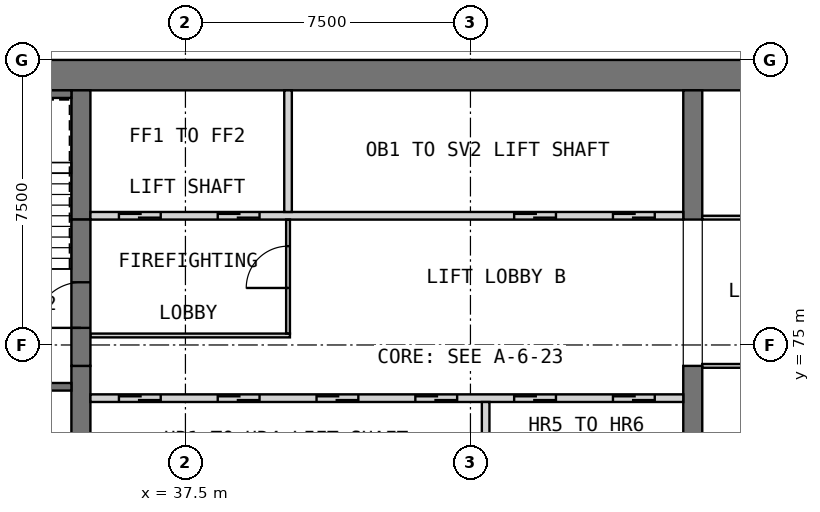
"""IFC4 building model, lengths in metres.
Left out: names, types, materials, properties, quantities, classifications, styles, units other than length and angle.
Written with IfcOpenShell. Run it as: python <this file> out.ifc"""

import sys

from ifc_helpers import new_model, si_unit, direction, frame, frame_2d, origin, place, context, subcontext, project, spatial, rectangle, extrude, element, fill, save


model = new_model("IFC4")
c1 = context("Model", 3, precision=1e-05, world=origin(), true_north=direction((0.0, 1.0)))
c2 = subcontext(c1, "Body", "Model", "MODEL_VIEW")
j1 = project(units=[si_unit("LENGTHUNIT", "METRE"), si_unit("PLANEANGLEUNIT", "RADIAN")], contexts=[c1])
p1 = place(None, origin())
s1 = spatial("IfcSite", under=j1, at=p1, CompositionType="ELEMENT")
p2 = place(p1, origin())
s2 = spatial("IfcBuilding", under=s1, at=p2, CompositionType="ELEMENT")
p3 = place(p2, frame((0.0, 0.0, 186.2)))
s3 = spatial("IfcBuildingStorey", under=s2, at=p3, CompositionType="ELEMENT", Elevation=186.2)
p4 = place(p3, frame((30.0, 82.1, 0.0), z_axis=(0.0, 0.0, 1.0), x_axis=(1.0, 0.0, 0.0)))
e1 = element("IfcWall", 1, at=p4, inside=s3, PredefinedType="SHEAR", context=c2, shape_type="SweptSolid", body=[
    extrude(rectangle(XDim=30.0, YDim=0.8, at=frame_2d((15.0, 0.0))), origin(), (0.0, 0.0, 1.0), 3.5),
])
p5 = place(p3, frame((34.75, 68.05, 0.0), z_axis=(0.0, 0.0, 1.0), x_axis=(0.0, 1.0, 0.0)))
e2 = element("IfcWall", 2, at=p5, inside=s3, PredefinedType="SHEAR", context=c2, shape_type="SweptSolid", body=[
    extrude(rectangle(XDim=6.4, YDim=0.5, at=frame_2d((3.2, 0.0))), origin(), (0.0, 0.0, 1.0), 3.5),
])
p6 = place(p3, frame((34.75, 78.3, 0.0), z_axis=(0.0, 0.0, 1.0), x_axis=(0.0, 1.0, 0.0)))
e3 = element("IfcWall", 3, at=p6, inside=s3, PredefinedType="SHEAR", context=c2, shape_type="SweptSolid", body=[
    extrude(rectangle(XDim=3.4, YDim=0.5, at=frame_2d((1.7, 0.0))), origin(), (0.0, 0.0, 1.0), 3.5),
])
p7 = place(p3, frame((50.85, 68.05, 0.0), z_axis=(0.0, 0.0, 1.0), x_axis=(0.0, 1.0, 0.0)))
e4 = element("IfcWall", 4, at=p7, inside=s3, PredefinedType="SHEAR", context=c2, shape_type="SweptSolid", body=[
    extrude(rectangle(XDim=6.4, YDim=0.5, at=frame_2d((3.2, 0.0))), origin(), (0.0, 0.0, 1.0), 3.5),
])
p8 = place(p3, frame((50.85, 78.3, 0.0), z_axis=(0.0, 0.0, 1.0), x_axis=(0.0, 1.0, 0.0)))
e5 = element("IfcWall", 5, at=p8, inside=s3, PredefinedType="SHEAR", context=c2, shape_type="SweptSolid", body=[
    extrude(rectangle(XDim=3.4, YDim=0.5, at=frame_2d((1.7, 0.0))), origin(), (0.0, 0.0, 1.0), 3.5),
])
p9 = place(p3, frame((35.0, 73.6, 0.0), z_axis=(0.0, 0.0, 1.0), x_axis=(1.0, 0.0, 0.0)))
e6 = element("IfcWall", 6, at=p9, inside=s3, PredefinedType="SOLIDWALL", context=c2, shape_type="SweptSolid", body=[
    extrude(rectangle(XDim=15.6, YDim=0.2, at=frame_2d((7.8, 0.0))), origin(), (0.0, 0.0, 1.0), 3.5),
])
p10 = place(p9, frame((0.75, 0.0, 0.0)))
e7 = element("IfcOpeningElement", 7, at=p10, cuts=e6, PredefinedType="OPENING", context=c2, shape_type="SweptSolid", body=[
    extrude(rectangle(XDim=1.1, YDim=2.1, at=frame_2d((0.55, 1.05))), frame((0.0, 0.11, 0.0), z_axis=(0.0, -1.0, 0.0), x_axis=(1.0, 0.0, 0.0)), (0.0, 0.0, 1.0), 0.22),
])
p11 = place(p9, frame((3.35, 0.0, 0.0)))
e8 = element("IfcOpeningElement", 8, at=p11, cuts=e6, PredefinedType="OPENING", context=c2, shape_type="SweptSolid", body=[
    extrude(rectangle(XDim=1.1, YDim=2.1, at=frame_2d((0.55, 1.05))), frame((0.0, 0.11, 0.0), z_axis=(0.0, -1.0, 0.0), x_axis=(1.0, 0.0, 0.0)), (0.0, 0.0, 1.0), 0.22),
])
p12 = place(p9, frame((5.95, 0.0, 0.0)))
e9 = element("IfcOpeningElement", 9, at=p12, cuts=e6, PredefinedType="OPENING", context=c2, shape_type="SweptSolid", body=[
    extrude(rectangle(XDim=1.1, YDim=2.1, at=frame_2d((0.55, 1.05))), frame((0.0, 0.11, 0.0), z_axis=(0.0, -1.0, 0.0), x_axis=(1.0, 0.0, 0.0)), (0.0, 0.0, 1.0), 0.22),
])
p13 = place(p9, frame((8.55, 0.0, 0.0)))
e10 = element("IfcOpeningElement", 10, at=p13, cuts=e6, PredefinedType="OPENING", context=c2, shape_type="SweptSolid", body=[
    extrude(rectangle(XDim=1.1, YDim=2.1, at=frame_2d((0.55, 1.05))), frame((0.0, 0.11, 0.0), z_axis=(0.0, -1.0, 0.0), x_axis=(1.0, 0.0, 0.0)), (0.0, 0.0, 1.0), 0.22),
])
p14 = place(p9, frame((11.15, 0.0, 0.0)))
e11 = element("IfcOpeningElement", 11, at=p14, cuts=e6, PredefinedType="OPENING", context=c2, shape_type="SweptSolid", body=[
    extrude(rectangle(XDim=1.1, YDim=2.1, at=frame_2d((0.55, 1.05))), frame((0.0, 0.11, 0.0), z_axis=(0.0, -1.0, 0.0), x_axis=(1.0, 0.0, 0.0)), (0.0, 0.0, 1.0), 0.22),
])
p15 = place(p9, frame((13.75, 0.0, 0.0)))
e12 = element("IfcOpeningElement", 12, at=p15, cuts=e6, PredefinedType="OPENING", context=c2, shape_type="SweptSolid", body=[
    extrude(rectangle(XDim=1.1, YDim=2.1, at=frame_2d((0.55, 1.05))), frame((0.0, 0.11, 0.0), z_axis=(0.0, -1.0, 0.0), x_axis=(1.0, 0.0, 0.0)), (0.0, 0.0, 1.0), 0.22),
])
p16 = place(p3, frame((45.4, 71.5, 0.0), z_axis=(0.0, 0.0, 1.0), x_axis=(0.0, 1.0, 0.0)))
e13 = element("IfcWall", 13, at=p16, inside=s3, PredefinedType="SOLIDWALL", context=c2, shape_type="SweptSolid", body=[
    extrude(rectangle(XDim=2.0, YDim=0.2, at=frame_2d((1.0, 0.0))), origin(), (0.0, 0.0, 1.0), 3.5),
])
p17 = place(p3, frame((35.0, 78.4, 0.0), z_axis=(0.0, 0.0, 1.0), x_axis=(1.0, 0.0, 0.0)))
e14 = element("IfcWall", 14, at=p17, inside=s3, PredefinedType="SOLIDWALL", context=c2, shape_type="SweptSolid", body=[
    extrude(rectangle(XDim=15.6, YDim=0.2, at=frame_2d((7.8, 0.0))), origin(), (0.0, 0.0, 1.0), 3.5),
])
p18 = place(p17, frame((0.75, 0.0, 0.0)))
e15 = element("IfcOpeningElement", 15, at=p18, cuts=e14, PredefinedType="OPENING", context=c2, shape_type="SweptSolid", body=[
    extrude(rectangle(XDim=1.1, YDim=2.1, at=frame_2d((0.55, 1.05))), frame((0.0, 0.11, 0.0), z_axis=(0.0, -1.0, 0.0), x_axis=(1.0, 0.0, 0.0)), (0.0, 0.0, 1.0), 0.22),
])
p19 = place(p17, frame((3.35, 0.0, 0.0)))
e16 = element("IfcOpeningElement", 16, at=p19, cuts=e14, PredefinedType="OPENING", context=c2, shape_type="SweptSolid", body=[
    extrude(rectangle(XDim=1.1, YDim=2.1, at=frame_2d((0.55, 1.05))), frame((0.0, 0.11, 0.0), z_axis=(0.0, -1.0, 0.0), x_axis=(1.0, 0.0, 0.0)), (0.0, 0.0, 1.0), 0.22),
])
p20 = place(p17, frame((11.15, 0.0, 0.0)))
e17 = element("IfcOpeningElement", 17, at=p20, cuts=e14, PredefinedType="OPENING", context=c2, shape_type="SweptSolid", body=[
    extrude(rectangle(XDim=1.1, YDim=2.1, at=frame_2d((0.55, 1.05))), frame((0.0, 0.11, 0.0), z_axis=(0.0, -1.0, 0.0), x_axis=(1.0, 0.0, 0.0)), (0.0, 0.0, 1.0), 0.22),
])
p21 = place(p17, frame((13.75, 0.0, 0.0)))
e18 = element("IfcOpeningElement", 18, at=p21, cuts=e14, PredefinedType="OPENING", context=c2, shape_type="SweptSolid", body=[
    extrude(rectangle(XDim=1.1, YDim=2.1, at=frame_2d((0.55, 1.05))), frame((0.0, 0.11, 0.0), z_axis=(0.0, -1.0, 0.0), x_axis=(1.0, 0.0, 0.0)), (0.0, 0.0, 1.0), 0.22),
])
p22 = place(p3, frame((40.2, 78.5, 0.0), z_axis=(0.0, 0.0, 1.0), x_axis=(0.0, 1.0, 0.0)))
e19 = element("IfcWall", 19, at=p22, inside=s3, PredefinedType="SOLIDWALL", context=c2, shape_type="SweptSolid", body=[
    extrude(rectangle(XDim=3.2, YDim=0.2, at=frame_2d((1.6, 0.0))), origin(), (0.0, 0.0, 1.0), 3.5),
])
p23 = place(p3, frame((35.0, 75.25, 0.0), z_axis=(0.0, 0.0, 1.0), x_axis=(1.0, 0.0, 0.0)))
e20 = element("IfcWall", 20, at=p23, inside=s3, PredefinedType="PARTITIONING", context=c2, shape_type="SweptSolid", body=[
    extrude(rectangle(XDim=5.25, YDim=0.1, at=frame_2d((2.625, 0.0))), origin(), (0.0, 0.0, 1.0), 3.25),
])
p24 = place(p3, frame((40.2, 75.3, 0.0), z_axis=(0.0, 0.0, 1.0), x_axis=(0.0, 1.0, 0.0)))
e21 = element("IfcWall", 21, at=p24, inside=s3, PredefinedType="PARTITIONING", context=c2, shape_type="SweptSolid", body=[
    extrude(rectangle(XDim=3.0, YDim=0.1, at=frame_2d((1.5, 0.0))), origin(), (0.0, 0.0, 1.0), 3.25),
])
p25 = place(p24, frame((1.2, 0.0, 0.0)))
e22 = element("IfcOpeningElement", 22, at=p25, cuts=e21, PredefinedType="OPENING", context=c2, shape_type="SweptSolid", body=[
    extrude(rectangle(XDim=1.1, YDim=2.1, at=frame_2d((0.55, 1.05))), frame((0.0, 0.06, 0.0), z_axis=(0.0, -1.0, 0.0), x_axis=(1.0, 0.0, 0.0)), (0.0, 0.0, 1.0), 0.12),
])
p26 = place(p3, frame((34.75, 74.45, 0.0), z_axis=(0.0, 0.0, 1.0), x_axis=(0.0, 1.0, 0.0)))
e23 = element("IfcWall", 23, at=p26, inside=s3, PredefinedType="SOLIDWALL", context=c2, shape_type="SweptSolid", body=[
    extrude(rectangle(XDim=3.85, YDim=0.5, at=frame_2d((1.925, 0.0))), origin(), (0.0, 0.0, 1.0), 2.3),
])
p27 = place(p26, frame((1.0, 0.0, 0.0)))
e24 = element("IfcOpeningElement", 24, at=p27, cuts=e23, PredefinedType="OPENING", context=c2, shape_type="SweptSolid", body=[
    extrude(rectangle(XDim=1.2, YDim=2.1, at=frame_2d((0.6, 1.05))), frame((0.0, 0.26, 0.0), z_axis=(0.0, -1.0, 0.0), x_axis=(1.0, 0.0, 0.0)), (0.0, 0.0, 1.0), 0.52),
])
p28 = place(p3, frame((30.8, 73.9, 0.0), z_axis=(0.0, 0.0, 1.0), x_axis=(1.0, 0.0, 0.0)))
e25 = element("IfcWall", 25, at=p28, inside=s3, PredefinedType="SOLIDWALL", context=c2, shape_type="SweptSolid", body=[
    extrude(rectangle(XDim=3.7, YDim=0.2, at=frame_2d((1.85, 0.0))), origin(), (0.0, 0.0, 1.0), 3.25),
])
p29 = place(p28, frame((1.5, 0.0, 0.0)))
e26 = element("IfcOpeningElement", 26, at=p29, cuts=e25, PredefinedType="OPENING", context=c2, shape_type="SweptSolid", body=[
    extrude(rectangle(XDim=0.9, YDim=2.1, at=frame_2d((0.45, 1.05))), frame((0.0, 0.11, 0.0), z_axis=(0.0, -1.0, 0.0), x_axis=(1.0, 0.0, 0.0)), (0.0, 0.0, 1.0), 0.22),
])
p30 = place(p3, frame((31.0, 81.6, 0.0), z_axis=(0.0, 0.0, 1.0), x_axis=(1.0, 0.0, 0.0)))
e27 = element("IfcWall", 27, at=p30, inside=s3, PredefinedType="SOLIDWALL", context=c2, shape_type="SweptSolid", body=[
    extrude(rectangle(XDim=3.5, YDim=0.2, at=frame_2d((1.75, 0.0))), origin(), (0.0, 0.0, 1.0), 3.25),
])
p31 = place(p3, frame((51.1, 74.45, 0.0), z_axis=(0.0, 0.0, 1.0), x_axis=(1.0, 0.0, 0.0)))
e28 = element("IfcWall", 28, at=p31, inside=s3, PredefinedType="PARTITIONING", context=c2, shape_type="SweptSolid", body=[
    extrude(rectangle(XDim=8.1, YDim=0.1, at=frame_2d((4.05, 0.0))), origin(), (0.0, 0.0, 1.0), 3.25),
])
p32 = place(p31, frame((3.6, 0.0, 0.0)))
e29 = element("IfcOpeningElement", 29, at=p32, cuts=e28, PredefinedType="OPENING", context=c2, shape_type="SweptSolid", body=[
    extrude(rectangle(XDim=0.9, YDim=2.1, at=frame_2d((0.45, 1.05))), frame((0.0, 0.06, 0.0), z_axis=(0.0, -1.0, 0.0), x_axis=(1.0, 0.0, 0.0)), (0.0, 0.0, 1.0), 0.12),
])
p33 = place(p3, frame((51.1, 78.35, 0.0), z_axis=(0.0, 0.0, 1.0), x_axis=(1.0, 0.0, 0.0)))
e30 = element("IfcWall", 30, at=p33, inside=s3, PredefinedType="PARTITIONING", context=c2, shape_type="SweptSolid", body=[
    extrude(rectangle(XDim=8.1, YDim=0.1, at=frame_2d((4.05, 0.0))), origin(), (0.0, 0.0, 1.0), 3.25),
])
p34 = place(p33, frame((3.6, 0.0, 0.0)))
e31 = element("IfcOpeningElement", 31, at=p34, cuts=e30, PredefinedType="OPENING", context=c2, shape_type="SweptSolid", body=[
    extrude(rectangle(XDim=0.9, YDim=2.1, at=frame_2d((0.45, 1.05))), frame((0.0, 0.06, 0.0), z_axis=(0.0, -1.0, 0.0), x_axis=(1.0, 0.0, 0.0)), (0.0, 0.0, 1.0), 0.12),
])
p35 = place(p10, origin())
e32 = element("IfcDoor", 32, at=p35, inside=s3, OperationType="DOUBLE_DOOR_SLIDING", PredefinedType="DOOR", context=c2, shape_type="SweptSolid", body=[
    extrude(rectangle(XDim=1.1, YDim=2.1, at=frame_2d((0.55, 1.05))), frame((0.0, 0.025, 0.0), z_axis=(0.0, -1.0, 0.0), x_axis=(1.0, 0.0, 0.0)), (0.0, 0.0, 1.0), 0.05),
])
fill(e7, e32)
p36 = place(p11, origin())
e33 = element("IfcDoor", 33, at=p36, inside=s3, OperationType="DOUBLE_DOOR_SLIDING", PredefinedType="DOOR", context=c2, shape_type="SweptSolid", body=[
    extrude(rectangle(XDim=1.1, YDim=2.1, at=frame_2d((0.55, 1.05))), frame((0.0, 0.025, 0.0), z_axis=(0.0, -1.0, 0.0), x_axis=(1.0, 0.0, 0.0)), (0.0, 0.0, 1.0), 0.05),
])
fill(e8, e33)
p37 = place(p12, origin())
e34 = element("IfcDoor", 34, at=p37, inside=s3, OperationType="DOUBLE_DOOR_SLIDING", PredefinedType="DOOR", context=c2, shape_type="SweptSolid", body=[
    extrude(rectangle(XDim=1.1, YDim=2.1, at=frame_2d((0.55, 1.05))), frame((0.0, 0.025, 0.0), z_axis=(0.0, -1.0, 0.0), x_axis=(1.0, 0.0, 0.0)), (0.0, 0.0, 1.0), 0.05),
])
fill(e9, e34)
p38 = place(p13, origin())
e35 = element("IfcDoor", 35, at=p38, inside=s3, OperationType="DOUBLE_DOOR_SLIDING", PredefinedType="DOOR", context=c2, shape_type="SweptSolid", body=[
    extrude(rectangle(XDim=1.1, YDim=2.1, at=frame_2d((0.55, 1.05))), frame((0.0, 0.025, 0.0), z_axis=(0.0, -1.0, 0.0), x_axis=(1.0, 0.0, 0.0)), (0.0, 0.0, 1.0), 0.05),
])
fill(e10, e35)
p39 = place(p14, origin())
e36 = element("IfcDoor", 36, at=p39, inside=s3, OperationType="DOUBLE_DOOR_SLIDING", PredefinedType="DOOR", context=c2, shape_type="SweptSolid", body=[
    extrude(rectangle(XDim=1.1, YDim=2.1, at=frame_2d((0.55, 1.05))), frame((0.0, 0.025, 0.0), z_axis=(0.0, -1.0, 0.0), x_axis=(1.0, 0.0, 0.0)), (0.0, 0.0, 1.0), 0.05),
])
fill(e11, e36)
p40 = place(p15, origin())
e37 = element("IfcDoor", 37, at=p40, inside=s3, OperationType="DOUBLE_DOOR_SLIDING", PredefinedType="DOOR", context=c2, shape_type="SweptSolid", body=[
    extrude(rectangle(XDim=1.1, YDim=2.1, at=frame_2d((0.55, 1.05))), frame((0.0, 0.025, 0.0), z_axis=(0.0, -1.0, 0.0), x_axis=(1.0, 0.0, 0.0)), (0.0, 0.0, 1.0), 0.05),
])
fill(e12, e37)
p41 = place(p18, origin())
e38 = element("IfcDoor", 38, at=p41, inside=s3, OperationType="DOUBLE_DOOR_SLIDING", PredefinedType="DOOR", context=c2, shape_type="SweptSolid", body=[
    extrude(rectangle(XDim=1.1, YDim=2.1, at=frame_2d((0.55, 1.05))), frame((0.0, 0.025, 0.0), z_axis=(0.0, -1.0, 0.0), x_axis=(1.0, 0.0, 0.0)), (0.0, 0.0, 1.0), 0.05),
])
fill(e15, e38)
p42 = place(p19, origin())
e39 = element("IfcDoor", 39, at=p42, inside=s3, OperationType="DOUBLE_DOOR_SLIDING", PredefinedType="DOOR", context=c2, shape_type="SweptSolid", body=[
    extrude(rectangle(XDim=1.1, YDim=2.1, at=frame_2d((0.55, 1.05))), frame((0.0, 0.025, 0.0), z_axis=(0.0, -1.0, 0.0), x_axis=(1.0, 0.0, 0.0)), (0.0, 0.0, 1.0), 0.05),
])
fill(e16, e39)
p43 = place(p20, origin())
e40 = element("IfcDoor", 40, at=p43, inside=s3, OperationType="DOUBLE_DOOR_SLIDING", PredefinedType="DOOR", context=c2, shape_type="SweptSolid", body=[
    extrude(rectangle(XDim=1.1, YDim=2.1, at=frame_2d((0.55, 1.05))), frame((0.0, 0.025, 0.0), z_axis=(0.0, -1.0, 0.0), x_axis=(1.0, 0.0, 0.0)), (0.0, 0.0, 1.0), 0.05),
])
fill(e17, e40)
p44 = place(p21, origin())
e41 = element("IfcDoor", 41, at=p44, inside=s3, OperationType="DOUBLE_DOOR_SLIDING", PredefinedType="DOOR", context=c2, shape_type="SweptSolid", body=[
    extrude(rectangle(XDim=1.1, YDim=2.1, at=frame_2d((0.55, 1.05))), frame((0.0, 0.025, 0.0), z_axis=(0.0, -1.0, 0.0), x_axis=(1.0, 0.0, 0.0)), (0.0, 0.0, 1.0), 0.05),
])
fill(e18, e41)
p45 = place(p25, origin())
e42 = element("IfcDoor", 42, at=p45, inside=s3, OperationType="SINGLE_SWING_LEFT", PredefinedType="DOOR", context=c2, shape_type="SweptSolid", body=[
    extrude(rectangle(XDim=1.1, YDim=2.1, at=frame_2d((0.55, 1.05))), frame((0.0, 0.025, 0.0), z_axis=(0.0, -1.0, 0.0), x_axis=(1.0, 0.0, 0.0)), (0.0, 0.0, 1.0), 0.05),
])
fill(e22, e42)
p46 = place(p27, origin())
e43 = element("IfcDoor", 43, at=p46, inside=s3, OperationType="SINGLE_SWING_RIGHT", PredefinedType="DOOR", context=c2, shape_type="SweptSolid", body=[
    extrude(rectangle(XDim=1.2, YDim=2.1, at=frame_2d((0.6, 1.05))), frame((0.0, 0.025, 0.0), z_axis=(0.0, -1.0, 0.0), x_axis=(1.0, 0.0, 0.0)), (0.0, 0.0, 1.0), 0.05),
])
fill(e24, e43)
save(model, sys.argv[1])
